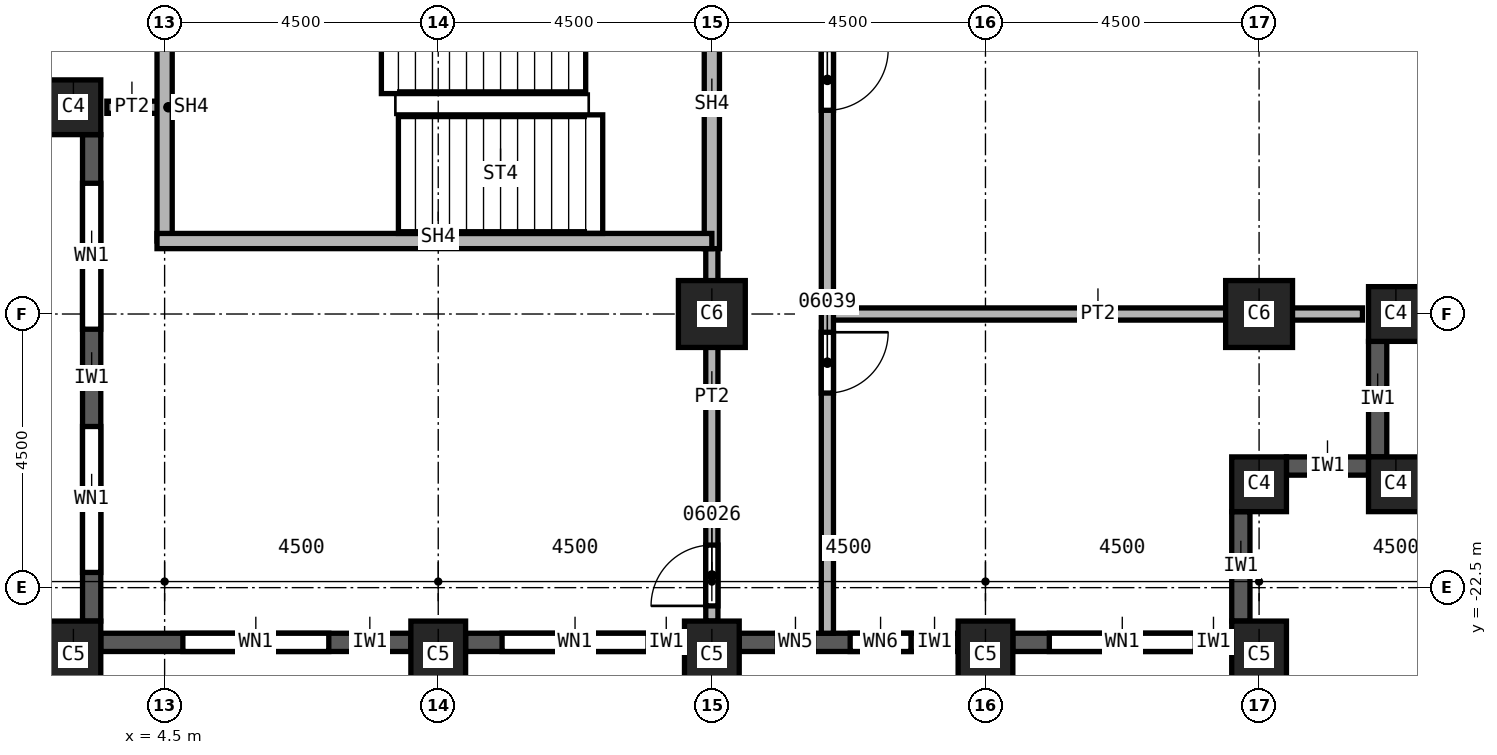
"""IFC4 building model, lengths in metres.
Left out: names, types, materials, properties, quantities, classifications, styles, units other than length and angle.
Written with IfcOpenShell. Run it as: python <this file> out.ifc"""

import sys

from ifc_helpers import new_model, si_unit, direction, frame, frame_2d, origin, origin_2d, place, context, subcontext, project, spatial, rectangle, extrude, element, fill, save


model = new_model("IFC4")
c1 = context("Model", 3, precision=1e-05, world=origin(), true_north=direction((0.0, 1.0)))
c2 = subcontext(c1, "Body", "Model", "MODEL_VIEW")
j1 = project(units=[si_unit("LENGTHUNIT", "METRE"), si_unit("PLANEANGLEUNIT", "RADIAN")], contexts=[c1])
p1 = place(None, origin())
s1 = spatial("IfcSite", under=j1, at=p1, CompositionType="ELEMENT")
p2 = place(p1, origin())
s2 = spatial("IfcBuilding", under=s1, at=p2, CompositionType="ELEMENT")
p3 = place(p2, frame((0.0, 0.0, 130.0)))
s3 = spatial("IfcBuildingStorey", under=s2, at=p3, CompositionType="ELEMENT", Elevation=130.0)
for number, where, z_axis, x_axis in (
    (1, (13.5, -18.0, 0.0), (0.0, 0.0, 1.0), (1.0, 0.0, 0.0)),
    (2, (22.5, -18.0, 0.0), (0.0, 0.0, 1.0), (1.0, 0.0, 0.0)),
):
    element("IfcColumn", number, at=place(p3, frame(where, z_axis=z_axis, x_axis=x_axis)), inside=s3, PredefinedType="COLUMN", context=c2, shape_type="SweptSolid", body=[
        extrude(rectangle(XDim=1.1, YDim=1.1, at=origin_2d()), origin(), (0.0, 0.0, 1.0), 3.7),
    ])
for number, where, z_axis, x_axis in (
    (3, (3.0, -23.6, 0.0), (0.0, 0.0, 1.0), (1.0, 0.0, 0.0)),
    (4, (9.0, -23.6, 0.0), (0.0, 0.0, 1.0), (1.0, 0.0, 0.0)),
    (5, (13.5, -23.6, 0.0), (0.0, 0.0, 1.0), (1.0, 0.0, 0.0)),
    (6, (18.0, -23.6, 0.0), (0.0, 0.0, 1.0), (1.0, 0.0, 0.0)),
    (7, (22.5, -23.6, 0.0), (0.0, 0.0, 1.0), (1.0, 0.0, 0.0)),
):
    element("IfcColumn", number, at=place(p3, frame(where, z_axis=z_axis, x_axis=x_axis)), inside=s3, PredefinedType="COLUMN", context=c2, shape_type="SweptSolid", body=[
        extrude(rectangle(XDim=0.9, YDim=1.1, at=origin_2d()), origin(), (0.0, 0.0, 1.0), 3.7),
    ])
for number, where, z_axis, x_axis in (
    (8, (3.0, -14.6, 0.0), (0.0, 0.0, 1.0), (1.0, 0.0, 0.0)),
    (9, (22.5, -20.8, 0.0), (0.0, 0.0, 1.0), (1.0, 0.0, 0.0)),
    (10, (24.75, -20.8, 0.0), (0.0, 0.0, 1.0), (1.0, 0.0, 0.0)),
    (11, (24.75, -18.0, 0.0), (0.0, 0.0, 1.0), (1.0, 0.0, 0.0)),
):
    element("IfcColumn", number, at=place(p3, frame(where, z_axis=z_axis, x_axis=x_axis)), inside=s3, PredefinedType="COLUMN", context=c2, shape_type="SweptSolid", body=[
        extrude(rectangle(XDim=0.9, YDim=0.9, at=origin_2d()), origin(), (0.0, 0.0, 1.0), 3.7),
    ])
p4 = place(p3, frame((3.3, -15.05, 0.0), z_axis=(0.0, 0.0, 1.0), x_axis=(0.0, -1.0, 0.0)))
e12 = element("IfcWall", 12, at=p4, inside=s3, PredefinedType="SOLIDWALL", context=c2, shape_type="SweptSolid", body=[
    extrude(rectangle(XDim=8.0, YDim=0.3, at=frame_2d((4.0, 0.0))), origin(), (0.0, 0.0, 1.0), 3.1),
])
p5 = place(p4, frame((0.8, 0.0, 0.8)))
e13 = element("IfcOpeningElement", 13, at=p5, cuts=e12, PredefinedType="OPENING", context=c2, shape_type="SweptSolid", body=[
    extrude(rectangle(XDim=2.4, YDim=1.95, at=frame_2d((1.2, 0.975))), frame((0.0, 0.15, 0.0), z_axis=(0.0, -1.0, 0.0), x_axis=(1.0, 0.0, 0.0)), (0.0, 0.0, 1.0), 0.3),
])
p6 = place(p4, frame((4.8, 0.0, 0.8)))
e14 = element("IfcOpeningElement", 14, at=p6, cuts=e12, PredefinedType="OPENING", context=c2, shape_type="SweptSolid", body=[
    extrude(rectangle(XDim=2.4, YDim=1.95, at=frame_2d((1.2, 0.975))), frame((0.0, 0.15, 0.0), z_axis=(0.0, -1.0, 0.0), x_axis=(1.0, 0.0, 0.0)), (0.0, 0.0, 1.0), 0.3),
])
p7 = place(p3, frame((3.45, -23.4, 0.0), z_axis=(0.0, 0.0, 1.0), x_axis=(1.0, 0.0, 0.0)))
e15 = element("IfcWall", 15, at=p7, inside=s3, PredefinedType="SOLIDWALL", context=c2, shape_type="SweptSolid", body=[
    extrude(rectangle(XDim=5.1, YDim=0.3, at=frame_2d((2.55, 0.0))), origin(), (0.0, 0.0, 1.0), 3.1),
])
p8 = place(p7, frame((1.35, 0.0, 0.8)))
e16 = element("IfcOpeningElement", 16, at=p8, cuts=e15, PredefinedType="OPENING", context=c2, shape_type="SweptSolid", body=[
    extrude(rectangle(XDim=2.4, YDim=1.95, at=frame_2d((1.2, 0.975))), frame((0.0, 0.15, 0.0), z_axis=(0.0, -1.0, 0.0), x_axis=(1.0, 0.0, 0.0)), (0.0, 0.0, 1.0), 0.3),
])
p9 = place(p3, frame((9.45, -23.4, 0.0), z_axis=(0.0, 0.0, 1.0), x_axis=(1.0, 0.0, 0.0)))
e17 = element("IfcWall", 17, at=p9, inside=s3, PredefinedType="SOLIDWALL", context=c2, shape_type="SweptSolid", body=[
    extrude(rectangle(XDim=3.6, YDim=0.3, at=frame_2d((1.8, 0.0))), origin(), (0.0, 0.0, 1.0), 3.1),
])
p10 = place(p9, frame((0.6, 0.0, 0.8)))
e18 = element("IfcOpeningElement", 18, at=p10, cuts=e17, PredefinedType="OPENING", context=c2, shape_type="SweptSolid", body=[
    extrude(rectangle(XDim=2.4, YDim=1.95, at=frame_2d((1.2, 0.975))), frame((0.0, 0.15, 0.0), z_axis=(0.0, -1.0, 0.0), x_axis=(1.0, 0.0, 0.0)), (0.0, 0.0, 1.0), 0.3),
])
p11 = place(p3, frame((13.95, -23.4, 0.0), z_axis=(0.0, 0.0, 1.0), x_axis=(1.0, 0.0, 0.0)))
e19 = element("IfcWall", 19, at=p11, inside=s3, PredefinedType="SOLIDWALL", context=c2, shape_type="SweptSolid", body=[
    extrude(rectangle(XDim=3.6, YDim=0.3, at=frame_2d((1.8, 0.0))), origin(), (0.0, 0.0, 1.0), 3.1),
])
p12 = place(p11, frame((0.625, 0.0, 0.8)))
e20 = element("IfcOpeningElement", 20, at=p12, cuts=e19, PredefinedType="OPENING", context=c2, shape_type="SweptSolid", body=[
    extrude(rectangle(XDim=0.6, YDim=1.95, at=frame_2d((0.3, 0.975))), frame((0.0, 0.15, 0.0), z_axis=(0.0, -1.0, 0.0), x_axis=(1.0, 0.0, 0.0)), (0.0, 0.0, 1.0), 0.3),
])
p13 = place(p11, frame((1.825, 0.0, 0.8)))
e21 = element("IfcOpeningElement", 21, at=p13, cuts=e19, PredefinedType="OPENING", context=c2, shape_type="SweptSolid", body=[
    extrude(rectangle(XDim=1.0, YDim=1.95, at=frame_2d((0.5, 0.975))), frame((0.0, 0.15, 0.0), z_axis=(0.0, -1.0, 0.0), x_axis=(1.0, 0.0, 0.0)), (0.0, 0.0, 1.0), 0.3),
])
p14 = place(p3, frame((18.45, -23.4, 0.0), z_axis=(0.0, 0.0, 1.0), x_axis=(1.0, 0.0, 0.0)))
e22 = element("IfcWall", 22, at=p14, inside=s3, PredefinedType="SOLIDWALL", context=c2, shape_type="SweptSolid", body=[
    extrude(rectangle(XDim=3.6, YDim=0.3, at=frame_2d((1.8, 0.0))), origin(), (0.0, 0.0, 1.0), 3.1),
])
p15 = place(p14, frame((0.6, 0.0, 0.8)))
e23 = element("IfcOpeningElement", 23, at=p15, cuts=e22, PredefinedType="OPENING", context=c2, shape_type="SweptSolid", body=[
    extrude(rectangle(XDim=2.4, YDim=1.95, at=frame_2d((1.2, 0.975))), frame((0.0, 0.15, 0.0), z_axis=(0.0, -1.0, 0.0), x_axis=(1.0, 0.0, 0.0)), (0.0, 0.0, 1.0), 0.3),
])
p16 = place(p3, frame((22.2, -23.05, 0.0), z_axis=(0.0, 0.0, 1.0), x_axis=(0.0, 1.0, 0.0)))
e24 = element("IfcWall", 24, at=p16, inside=s3, PredefinedType="SOLIDWALL", context=c2, shape_type="SweptSolid", body=[
    extrude(rectangle(XDim=1.8, YDim=0.3, at=frame_2d((0.9, 0.0))), origin(), (0.0, 0.0, 1.0), 3.1),
])
p17 = place(p3, frame((22.95, -20.5, 0.0), z_axis=(0.0, 0.0, 1.0), x_axis=(1.0, 0.0, 0.0)))
e25 = element("IfcWall", 25, at=p17, inside=s3, PredefinedType="SOLIDWALL", context=c2, shape_type="SweptSolid", body=[
    extrude(rectangle(XDim=1.35, YDim=0.3, at=frame_2d((0.675, 0.0))), origin(), (0.0, 0.0, 1.0), 3.1),
])
p18 = place(p3, frame((24.45, -20.35, 0.0), z_axis=(0.0, 0.0, 1.0), x_axis=(0.0, 1.0, 0.0)))
e26 = element("IfcWall", 26, at=p18, inside=s3, PredefinedType="SOLIDWALL", context=c2, shape_type="SweptSolid", body=[
    extrude(rectangle(XDim=1.9, YDim=0.3, at=frame_2d((0.95, 0.0))), origin(), (0.0, 0.0, 1.0), 3.1),
])
p19 = place(p3, frame((4.5, -14.6, 0.0), z_axis=(0.0, 0.0, 1.0), x_axis=(-1.0, 0.0, 0.0)))
e27 = element("IfcWall", 27, at=p19, inside=s3, PredefinedType="PARTITIONING", context=c2, shape_type="SweptSolid", body=[
    extrude(rectangle(XDim=0.95, YDim=0.2, at=frame_2d((0.475, 0.0))), origin(), (0.0, 0.0, 1.0), 3.7),
])
p20 = place(p3, frame((13.5, -23.05, 0.0), z_axis=(0.0, 0.0, 1.0), x_axis=(0.0, 1.0, 0.0)))
e28 = element("IfcWall", 28, at=p20, inside=s3, PredefinedType="PARTITIONING", context=c2, shape_type="SweptSolid", body=[
    extrude(rectangle(XDim=6.375, YDim=0.2, at=frame_2d((3.188, 0.0))), origin(), (0.0, 0.0, 1.0), 3.7),
])
p21 = place(p20, frame((0.25, 0.0, 0.0)))
e29 = element("IfcOpeningElement", 29, at=p21, cuts=e28, PredefinedType="OPENING", context=c2, shape_type="SweptSolid", body=[
    extrude(rectangle(XDim=1.0, YDim=2.1, at=frame_2d((0.5, 1.05))), frame((0.0, 0.1, 0.0), z_axis=(0.0, -1.0, 0.0), x_axis=(1.0, 0.0, 0.0)), (0.0, 0.0, 1.0), 0.2),
])
p22 = place(p3, frame((15.4, -18.0, 0.0), z_axis=(0.0, 0.0, 1.0), x_axis=(1.0, 0.0, 0.0)))
e30 = element("IfcWall", 30, at=p22, inside=s3, PredefinedType="PARTITIONING", context=c2, shape_type="SweptSolid", body=[
    extrude(rectangle(XDim=8.8, YDim=0.2, at=frame_2d((4.4, 0.0))), origin(), (0.0, 0.0, 1.0), 3.7),
])
p23 = place(p3, frame((15.4, -3.65, 0.0), z_axis=(0.0, 0.0, 1.0), x_axis=(0.0, -1.0, 0.0)))
e31 = element("IfcWall", 31, at=p23, inside=s3, PredefinedType="PARTITIONING", context=c2, shape_type="SweptSolid", body=[
    extrude(rectangle(XDim=19.6, YDim=0.2, at=frame_2d((9.8, 0.0))), origin(), (0.0, 0.0, 1.0), 3.7),
])
p24 = place(p23, frame((14.65, 0.0, 0.0)))
e32 = element("IfcOpeningElement", 32, at=p24, cuts=e31, PredefinedType="OPENING", context=c2, shape_type="SweptSolid", body=[
    extrude(rectangle(XDim=1.0, YDim=2.1, at=frame_2d((0.5, 1.05))), frame((0.0, 0.1, 0.0), z_axis=(0.0, -1.0, 0.0), x_axis=(1.0, 0.0, 0.0)), (0.0, 0.0, 1.0), 0.2),
])
p25 = place(p23, frame((10.0, 0.0, 0.0)))
e33 = element("IfcOpeningElement", 33, at=p25, cuts=e31, PredefinedType="OPENING", context=c2, shape_type="SweptSolid", body=[
    extrude(rectangle(XDim=1.0, YDim=2.1, at=frame_2d((0.5, 1.05))), frame((0.0, 0.1, 0.0), z_axis=(0.0, -1.0, 0.0), x_axis=(1.0, 0.0, 0.0)), (0.0, 0.0, 1.0), 0.2),
])
p26 = place(p23, frame((7.15, 0.0, 0.0)))
e34 = element("IfcOpeningElement", 34, at=p26, cuts=e31, PredefinedType="OPENING", context=c2, shape_type="SweptSolid", body=[
    extrude(rectangle(XDim=1.0, YDim=2.1, at=frame_2d((0.5, 1.05))), frame((0.0, 0.1, 0.0), z_axis=(0.0, -1.0, 0.0), x_axis=(1.0, 0.0, 0.0)), (0.0, 0.0, 1.0), 0.2),
])
p27 = place(p3, frame((4.5, -16.8, 0.0), z_axis=(0.0, 0.0, 1.0), x_axis=(0.0, 1.0, 0.0)))
e35 = element("IfcWall", 35, at=p27, inside=s3, PredefinedType="SOLIDWALL", context=c2, shape_type="SweptSolid", body=[
    extrude(rectangle(XDim=4.5, YDim=0.25, at=frame_2d((2.25, 0.0))), origin(), (0.0, 0.0, 1.0), 3.7),
])
p28 = place(p3, frame((13.5, -16.925, 0.0), z_axis=(0.0, 0.0, 1.0), x_axis=(0.0, 1.0, 0.0)))
e36 = element("IfcWall", 36, at=p28, inside=s3, PredefinedType="SOLIDWALL", context=c2, shape_type="SweptSolid", body=[
    extrude(rectangle(XDim=4.75, YDim=0.25, at=frame_2d((2.375, 0.0))), origin(), (0.0, 0.0, 1.0), 3.7),
])
p29 = place(p3, frame((13.5, -16.8, 0.0), z_axis=(0.0, 0.0, 1.0), x_axis=(-1.0, 0.0, 0.0)))
e37 = element("IfcWall", 37, at=p29, inside=s3, PredefinedType="SOLIDWALL", context=c2, shape_type="SweptSolid", body=[
    extrude(rectangle(XDim=9.125, YDim=0.25, at=frame_2d((4.562, 0.0))), origin(), (0.0, 0.0, 1.0), 3.7),
])
p30 = place(p5, origin())
e38 = element("IfcWindow", 38, at=p30, inside=s3, PartitioningType="SINGLE_PANEL", PredefinedType="WINDOW", context=c2, shape_type="SweptSolid", body=[
    extrude(rectangle(XDim=2.4, YDim=1.95, at=frame_2d((1.2, 0.975))), frame((0.0, 0.03, 0.0), z_axis=(0.0, -1.0, 0.0), x_axis=(1.0, 0.0, 0.0)), (0.0, 0.0, 1.0), 0.06),
])
fill(e13, e38)
p31 = place(p6, origin())
e39 = element("IfcWindow", 39, at=p31, inside=s3, PartitioningType="SINGLE_PANEL", PredefinedType="WINDOW", context=c2, shape_type="SweptSolid", body=[
    extrude(rectangle(XDim=2.4, YDim=1.95, at=frame_2d((1.2, 0.975))), frame((0.0, 0.03, 0.0), z_axis=(0.0, -1.0, 0.0), x_axis=(1.0, 0.0, 0.0)), (0.0, 0.0, 1.0), 0.06),
])
fill(e14, e39)
p32 = place(p8, origin())
e40 = element("IfcWindow", 40, at=p32, inside=s3, PartitioningType="SINGLE_PANEL", PredefinedType="WINDOW", context=c2, shape_type="SweptSolid", body=[
    extrude(rectangle(XDim=2.4, YDim=1.95, at=frame_2d((1.2, 0.975))), frame((0.0, 0.03, 0.0), z_axis=(0.0, -1.0, 0.0), x_axis=(1.0, 0.0, 0.0)), (0.0, 0.0, 1.0), 0.06),
])
fill(e16, e40)
p33 = place(p10, origin())
e41 = element("IfcWindow", 41, at=p33, inside=s3, PartitioningType="SINGLE_PANEL", PredefinedType="WINDOW", context=c2, shape_type="SweptSolid", body=[
    extrude(rectangle(XDim=2.4, YDim=1.95, at=frame_2d((1.2, 0.975))), frame((0.0, 0.03, 0.0), z_axis=(0.0, -1.0, 0.0), x_axis=(1.0, 0.0, 0.0)), (0.0, 0.0, 1.0), 0.06),
])
fill(e18, e41)
p34 = place(p15, origin())
e42 = element("IfcWindow", 42, at=p34, inside=s3, PartitioningType="SINGLE_PANEL", PredefinedType="WINDOW", context=c2, shape_type="SweptSolid", body=[
    extrude(rectangle(XDim=2.4, YDim=1.95, at=frame_2d((1.2, 0.975))), frame((0.0, 0.03, 0.0), z_axis=(0.0, -1.0, 0.0), x_axis=(1.0, 0.0, 0.0)), (0.0, 0.0, 1.0), 0.06),
])
fill(e23, e42)
p35 = place(p21, origin())
e43 = element("IfcDoor", 43, at=p35, inside=s3, OperationType="SINGLE_SWING_LEFT", PredefinedType="DOOR", context=c2, shape_type="SweptSolid", body=[
    extrude(rectangle(XDim=1.0, YDim=2.1, at=frame_2d((0.5, 1.05))), frame((0.0, 0.025, 0.0), z_axis=(0.0, -1.0, 0.0), x_axis=(1.0, 0.0, 0.0)), (0.0, 0.0, 1.0), 0.05),
])
fill(e29, e43)
p36 = place(p24, origin())
e44 = element("IfcDoor", 44, at=p36, inside=s3, OperationType="SINGLE_SWING_RIGHT", PredefinedType="DOOR", context=c2, shape_type="SweptSolid", body=[
    extrude(rectangle(XDim=1.0, YDim=2.1, at=frame_2d((0.5, 1.05))), frame((0.0, 0.025, 0.0), z_axis=(0.0, -1.0, 0.0), x_axis=(1.0, 0.0, 0.0)), (0.0, 0.0, 1.0), 0.05),
])
fill(e32, e44)
p37 = place(p25, origin())
e45 = element("IfcDoor", 45, at=p37, inside=s3, OperationType="SINGLE_SWING_LEFT", PredefinedType="DOOR", context=c2, shape_type="SweptSolid", body=[
    extrude(rectangle(XDim=1.0, YDim=2.1, at=frame_2d((0.5, 1.05))), frame((0.0, 0.025, 0.0), z_axis=(0.0, -1.0, 0.0), x_axis=(1.0, 0.0, 0.0)), (0.0, 0.0, 1.0), 0.05),
])
fill(e33, e45)
p38 = place(p12, origin())
e46 = element("IfcWindow", 46, at=p38, inside=s3, PartitioningType="SINGLE_PANEL", PredefinedType="WINDOW", context=c2, shape_type="SweptSolid", body=[
    extrude(rectangle(XDim=0.6, YDim=1.95, at=frame_2d((0.3, 0.975))), frame((0.0, 0.03, 0.0), z_axis=(0.0, -1.0, 0.0), x_axis=(1.0, 0.0, 0.0)), (0.0, 0.0, 1.0), 0.06),
])
fill(e20, e46)
p39 = place(p13, origin())
e47 = element("IfcWindow", 47, at=p39, inside=s3, PartitioningType="SINGLE_PANEL", PredefinedType="WINDOW", context=c2, shape_type="SweptSolid", body=[
    extrude(rectangle(XDim=1.0, YDim=1.95, at=frame_2d((0.5, 0.975))), frame((0.0, 0.03, 0.0), z_axis=(0.0, -1.0, 0.0), x_axis=(1.0, 0.0, 0.0)), (0.0, 0.0, 1.0), 0.06),
])
fill(e21, e47)
save(model, sys.argv[1])
